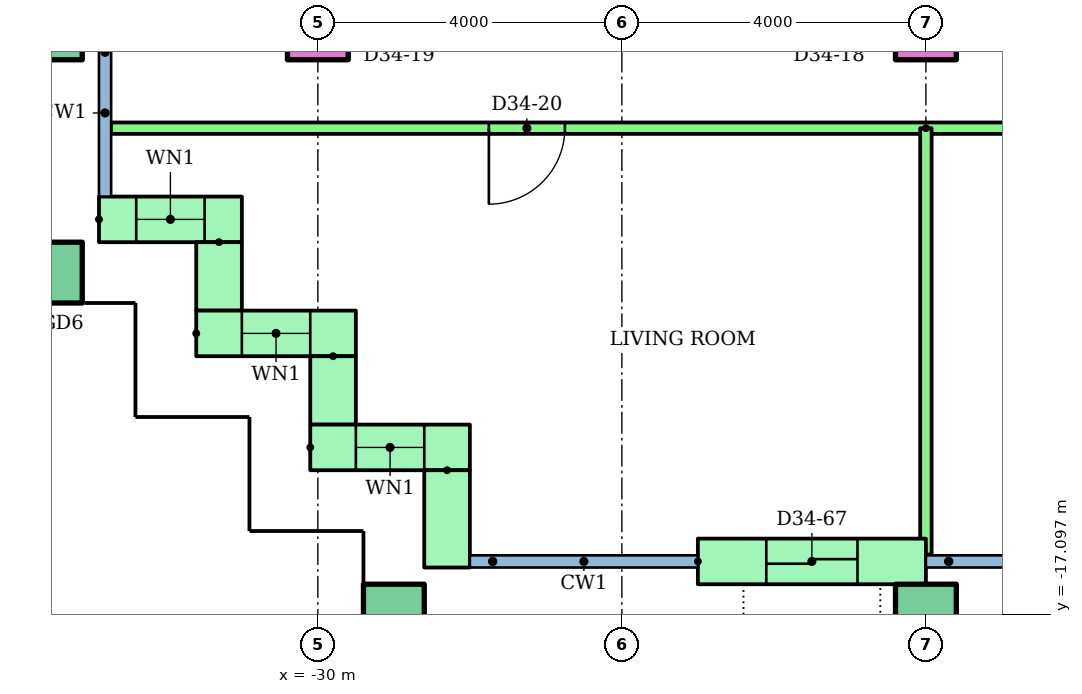
"""IFC4 building model, lengths in metres.
Left out: names, types, materials, properties, quantities, classifications, styles, units other than length and angle.
Written with IfcOpenShell. Run it as: python <this file> out.ifc"""

import sys

from ifc_helpers import new_model, si_unit, direction, frame, frame_2d, origin, origin_2d, place, context, subcontext, project, spatial, rectangle, hollow_rectangle, extrude, element, fill, save


model = new_model("IFC4")
c1 = context("Model", 3, precision=1e-05, world=origin(), true_north=direction((0.0, 1.0)))
c2 = subcontext(c1, "Body", "Model", "MODEL_VIEW")
j1 = project(units=[si_unit("LENGTHUNIT", "METRE"), si_unit("PLANEANGLEUNIT", "RADIAN")], contexts=[c1])
p1 = place(None, origin())
s1 = spatial("IfcSite", under=j1, at=p1, CompositionType="ELEMENT")
p2 = place(p1, origin())
s2 = spatial("IfcBuilding", under=s1, at=p2, CompositionType="ELEMENT")
p3 = place(p2, frame((0.0, 0.0, 132.6)))
s3 = spatial("IfcBuildingStorey", under=s2, at=p3, CompositionType="ELEMENT", Elevation=132.6)
for number, where in (
    (1, (-29.0, -17.1, 0.0)),
    (2, (-22.0, -17.1, 0.0)),
    (3, (-33.5, -12.6, 0.0)),
    (4, (-33.5, -9.4, 0.0)),
):
    element("IfcColumn", number, at=place(p3, frame(where)), inside=s3, PredefinedType="COLUMN", context=c2, shape_type="SweptSolid", body=[
        extrude(hollow_rectangle(XDim=0.8, YDim=0.8, WallThickness=0.04, at=origin_2d()), origin(), (0.0, 0.0, 1.0), 3.2),
    ])
for number, where in (
    (5, (-30.0, -9.4, 0.0)),
    (6, (-22.0, -9.4, 0.0)),
):
    element("IfcColumn", number, at=place(p3, frame(where)), inside=s3, PredefinedType="COLUMN", context=c2, shape_type="SweptSolid", body=[
        extrude(rectangle(XDim=0.8, YDim=0.8, at=origin_2d()), origin(), (0.0, 0.0, 1.0), 3.2),
    ])
p4 = place(p3, frame((-32.88, -11.9, 0.0)))
e7 = element("IfcWall", 7, at=p4, inside=s3, PredefinedType="STANDARD", context=c2, shape_type="SweptSolid", body=[
    extrude(rectangle(XDim=1.88, YDim=0.6, at=frame_2d((0.94, 0.0))), origin(), (0.0, 0.0, 1.0), 2.92),
])
p5 = place(p4, frame((0.49, 0.0, 0.9)))
e8 = element("IfcOpeningElement", 8, at=p5, cuts=e7, PredefinedType="OPENING", context=c2, shape_type="SweptSolid", body=[
    extrude(rectangle(XDim=0.9, YDim=1.5, at=frame_2d((0.45, 0.75))), frame((0.0, 0.31, 0.0), z_axis=(0.0, -1.0, 0.0), x_axis=(1.0, 0.0, 0.0)), (0.0, 0.0, 1.0), 0.62),
])
p6 = place(p3, frame((-31.3, -12.2, 0.0), z_axis=(0.0, 0.0, 1.0), x_axis=(0.0, -1.0, 0.0)))
e9 = element("IfcWall", 9, at=p6, inside=s3, PredefinedType="STANDARD", context=c2, shape_type="SweptSolid", body=[
    extrude(rectangle(XDim=0.9, YDim=0.6, at=frame_2d((0.45, 0.0))), origin(), (0.0, 0.0, 1.0), 2.92),
])
p7 = place(p3, frame((-31.6, -13.4, 0.0)))
e10 = element("IfcWall", 10, at=p7, inside=s3, PredefinedType="STANDARD", context=c2, shape_type="SweptSolid", body=[
    extrude(rectangle(XDim=2.1, YDim=0.6, at=frame_2d((1.05, 0.0))), origin(), (0.0, 0.0, 1.0), 2.92),
])
p8 = place(p7, frame((0.6, 0.0, 0.9)))
e11 = element("IfcOpeningElement", 11, at=p8, cuts=e10, PredefinedType="OPENING", context=c2, shape_type="SweptSolid", body=[
    extrude(rectangle(XDim=0.9, YDim=1.5, at=frame_2d((0.45, 0.75))), frame((0.0, 0.31, 0.0), z_axis=(0.0, -1.0, 0.0), x_axis=(1.0, 0.0, 0.0)), (0.0, 0.0, 1.0), 0.62),
])
p9 = place(p3, frame((-29.8, -13.7, 0.0), z_axis=(0.0, 0.0, 1.0), x_axis=(0.0, -1.0, 0.0)))
e12 = element("IfcWall", 12, at=p9, inside=s3, PredefinedType="STANDARD", context=c2, shape_type="SweptSolid", body=[
    extrude(rectangle(XDim=0.9, YDim=0.6, at=frame_2d((0.45, 0.0))), origin(), (0.0, 0.0, 1.0), 2.92),
])
p10 = place(p3, frame((-30.1, -14.9, 0.0)))
e13 = element("IfcWall", 13, at=p10, inside=s3, PredefinedType="STANDARD", context=c2, shape_type="SweptSolid", body=[
    extrude(rectangle(XDim=2.1, YDim=0.6, at=frame_2d((1.05, 0.0))), origin(), (0.0, 0.0, 1.0), 2.92),
])
p11 = place(p10, frame((0.6, 0.0, 0.9)))
e14 = element("IfcOpeningElement", 14, at=p11, cuts=e13, PredefinedType="OPENING", context=c2, shape_type="SweptSolid", body=[
    extrude(rectangle(XDim=0.9, YDim=1.5, at=frame_2d((0.45, 0.75))), frame((0.0, 0.31, 0.0), z_axis=(0.0, -1.0, 0.0), x_axis=(1.0, 0.0, 0.0)), (0.0, 0.0, 1.0), 0.62),
])
p12 = place(p3, frame((-28.3, -15.2, 0.0), z_axis=(0.0, 0.0, 1.0), x_axis=(0.0, -1.0, 0.0)))
e15 = element("IfcWall", 15, at=p12, inside=s3, PredefinedType="STANDARD", context=c2, shape_type="SweptSolid", body=[
    extrude(rectangle(XDim=1.28, YDim=0.6, at=frame_2d((0.64, 0.0))), origin(), (0.0, 0.0, 1.0), 2.92),
])
p13 = place(p3, frame((-25.0, -16.4, 0.0)))
e16 = element("IfcWall", 16, at=p13, inside=s3, PredefinedType="STANDARD", context=c2, shape_type="SweptSolid", body=[
    extrude(rectangle(XDim=3.0, YDim=0.6, at=frame_2d((1.5, 0.0))), origin(), (0.0, 0.0, 1.0), 2.92),
])
p14 = place(p13, frame((0.9, 0.0, 0.0)))
e17 = element("IfcOpeningElement", 17, at=p14, cuts=e16, PredefinedType="OPENING", context=c2, shape_type="SweptSolid", body=[
    extrude(rectangle(XDim=1.2, YDim=2.1, at=frame_2d((0.6, 1.05))), frame((0.0, 0.31, 0.0), z_axis=(0.0, -1.0, 0.0), x_axis=(1.0, 0.0, 0.0)), (0.0, 0.0, 1.0), 0.62),
])
p15 = place(p3, frame((-6.0, -10.7, 0.0), z_axis=(0.0, 0.0, 1.0), x_axis=(-1.0, 0.0, 0.0)))
e18 = element("IfcWall", 18, at=p15, inside=s3, PredefinedType="PARTITIONING", context=c2, shape_type="SweptSolid", body=[
    extrude(rectangle(XDim=26.72, YDim=0.15, at=frame_2d((13.36, 0.0))), origin(), (0.0, 0.0, 1.0), 2.4),
])
p16 = place(p15, frame((20.75, 0.0, 0.0)))
e19 = element("IfcOpeningElement", 19, at=p16, cuts=e18, PredefinedType="OPENING", context=c2, shape_type="SweptSolid", body=[
    extrude(rectangle(XDim=1.0, YDim=2.1, at=frame_2d((0.5, 1.05))), frame((0.0, 0.085, 0.0), z_axis=(0.0, -1.0, 0.0), x_axis=(1.0, 0.0, 0.0)), (0.0, 0.0, 1.0), 0.17),
])
p17 = place(p15, frame((13.55, 0.0, 0.0)))
e20 = element("IfcOpeningElement", 20, at=p17, cuts=e18, PredefinedType="OPENING", context=c2, shape_type="SweptSolid", body=[
    extrude(rectangle(XDim=0.9, YDim=2.1, at=frame_2d((0.45, 1.05))), frame((0.0, 0.085, 0.0), z_axis=(0.0, -1.0, 0.0), x_axis=(1.0, 0.0, 0.0)), (0.0, 0.0, 1.0), 0.17),
])
p18 = place(p15, frame((9.55, 0.0, 0.0)))
e21 = element("IfcOpeningElement", 21, at=p18, cuts=e18, PredefinedType="OPENING", context=c2, shape_type="SweptSolid", body=[
    extrude(rectangle(XDim=0.9, YDim=2.1, at=frame_2d((0.45, 1.05))), frame((0.0, 0.085, 0.0), z_axis=(0.0, -1.0, 0.0), x_axis=(1.0, 0.0, 0.0)), (0.0, 0.0, 1.0), 0.17),
])
p19 = place(p15, frame((5.55, 0.0, 0.0)))
e22 = element("IfcOpeningElement", 22, at=p19, cuts=e18, PredefinedType="OPENING", context=c2, shape_type="SweptSolid", body=[
    extrude(rectangle(XDim=0.9, YDim=2.1, at=frame_2d((0.45, 1.05))), frame((0.0, 0.085, 0.0), z_axis=(0.0, -1.0, 0.0), x_axis=(1.0, 0.0, 0.0)), (0.0, 0.0, 1.0), 0.17),
])
p20 = place(p15, frame((1.55, 0.0, 0.0)))
e23 = element("IfcOpeningElement", 23, at=p20, cuts=e18, PredefinedType="OPENING", context=c2, shape_type="SweptSolid", body=[
    extrude(rectangle(XDim=0.9, YDim=2.1, at=frame_2d((0.45, 1.05))), frame((0.0, 0.085, 0.0), z_axis=(0.0, -1.0, 0.0), x_axis=(1.0, 0.0, 0.0)), (0.0, 0.0, 1.0), 0.17),
])
p21 = place(p3, frame((-22.0, -10.7, 0.0), z_axis=(0.0, 0.0, 1.0), x_axis=(0.0, -1.0, 0.0)))
e24 = element("IfcWall", 24, at=p21, inside=s3, PredefinedType="PARTITIONING", context=c2, shape_type="SweptSolid", body=[
    extrude(rectangle(XDim=5.61, YDim=0.15, at=frame_2d((2.805, 0.0))), origin(), (0.0, 0.0, 1.0), 2.4),
])
p22 = place(p5, origin())
e25 = element("IfcWindow", 25, at=p22, inside=s3, PartitioningType="SINGLE_PANEL", PredefinedType="WINDOW", context=c2, shape_type="SweptSolid", body=[
    extrude(rectangle(XDim=0.9, YDim=1.5, at=frame_2d((0.45, 0.75))), frame((0.0, 0.03, 0.0), z_axis=(0.0, -1.0, 0.0), x_axis=(1.0, 0.0, 0.0)), (0.0, 0.0, 1.0), 0.06),
])
fill(e8, e25)
p23 = place(p8, origin())
e26 = element("IfcWindow", 26, at=p23, inside=s3, PartitioningType="SINGLE_PANEL", PredefinedType="WINDOW", context=c2, shape_type="SweptSolid", body=[
    extrude(rectangle(XDim=0.9, YDim=1.5, at=frame_2d((0.45, 0.75))), frame((0.0, 0.03, 0.0), z_axis=(0.0, -1.0, 0.0), x_axis=(1.0, 0.0, 0.0)), (0.0, 0.0, 1.0), 0.06),
])
fill(e11, e26)
p24 = place(p11, origin())
e27 = element("IfcWindow", 27, at=p24, inside=s3, PartitioningType="SINGLE_PANEL", PredefinedType="WINDOW", context=c2, shape_type="SweptSolid", body=[
    extrude(rectangle(XDim=0.9, YDim=1.5, at=frame_2d((0.45, 0.75))), frame((0.0, 0.03, 0.0), z_axis=(0.0, -1.0, 0.0), x_axis=(1.0, 0.0, 0.0)), (0.0, 0.0, 1.0), 0.06),
])
fill(e14, e27)
p25 = place(p16, origin())
e28 = element("IfcDoor", 28, at=p25, inside=s3, OperationType="SINGLE_SWING_RIGHT", PredefinedType="DOOR", context=c2, shape_type="SweptSolid", body=[
    extrude(rectangle(XDim=1.0, YDim=2.1, at=frame_2d((0.5, 1.05))), frame((0.0, 0.025, 0.0), z_axis=(0.0, -1.0, 0.0), x_axis=(1.0, 0.0, 0.0)), (0.0, 0.0, 1.0), 0.05),
])
fill(e19, e28)
p26 = place(p14, origin())
e29 = element("IfcDoor", 29, at=p26, inside=s3, OperationType="SLIDING_TO_LEFT", PredefinedType="DOOR", context=c2, shape_type="SweptSolid", body=[
    extrude(rectangle(XDim=1.2, YDim=2.1, at=frame_2d((0.6, 1.05))), frame((0.0, 0.025, 0.0), z_axis=(0.0, -1.0, 0.0), x_axis=(1.0, 0.0, 0.0)), (0.0, 0.0, 1.0), 0.05),
])
fill(e17, e29)
save(model, sys.argv[1])
